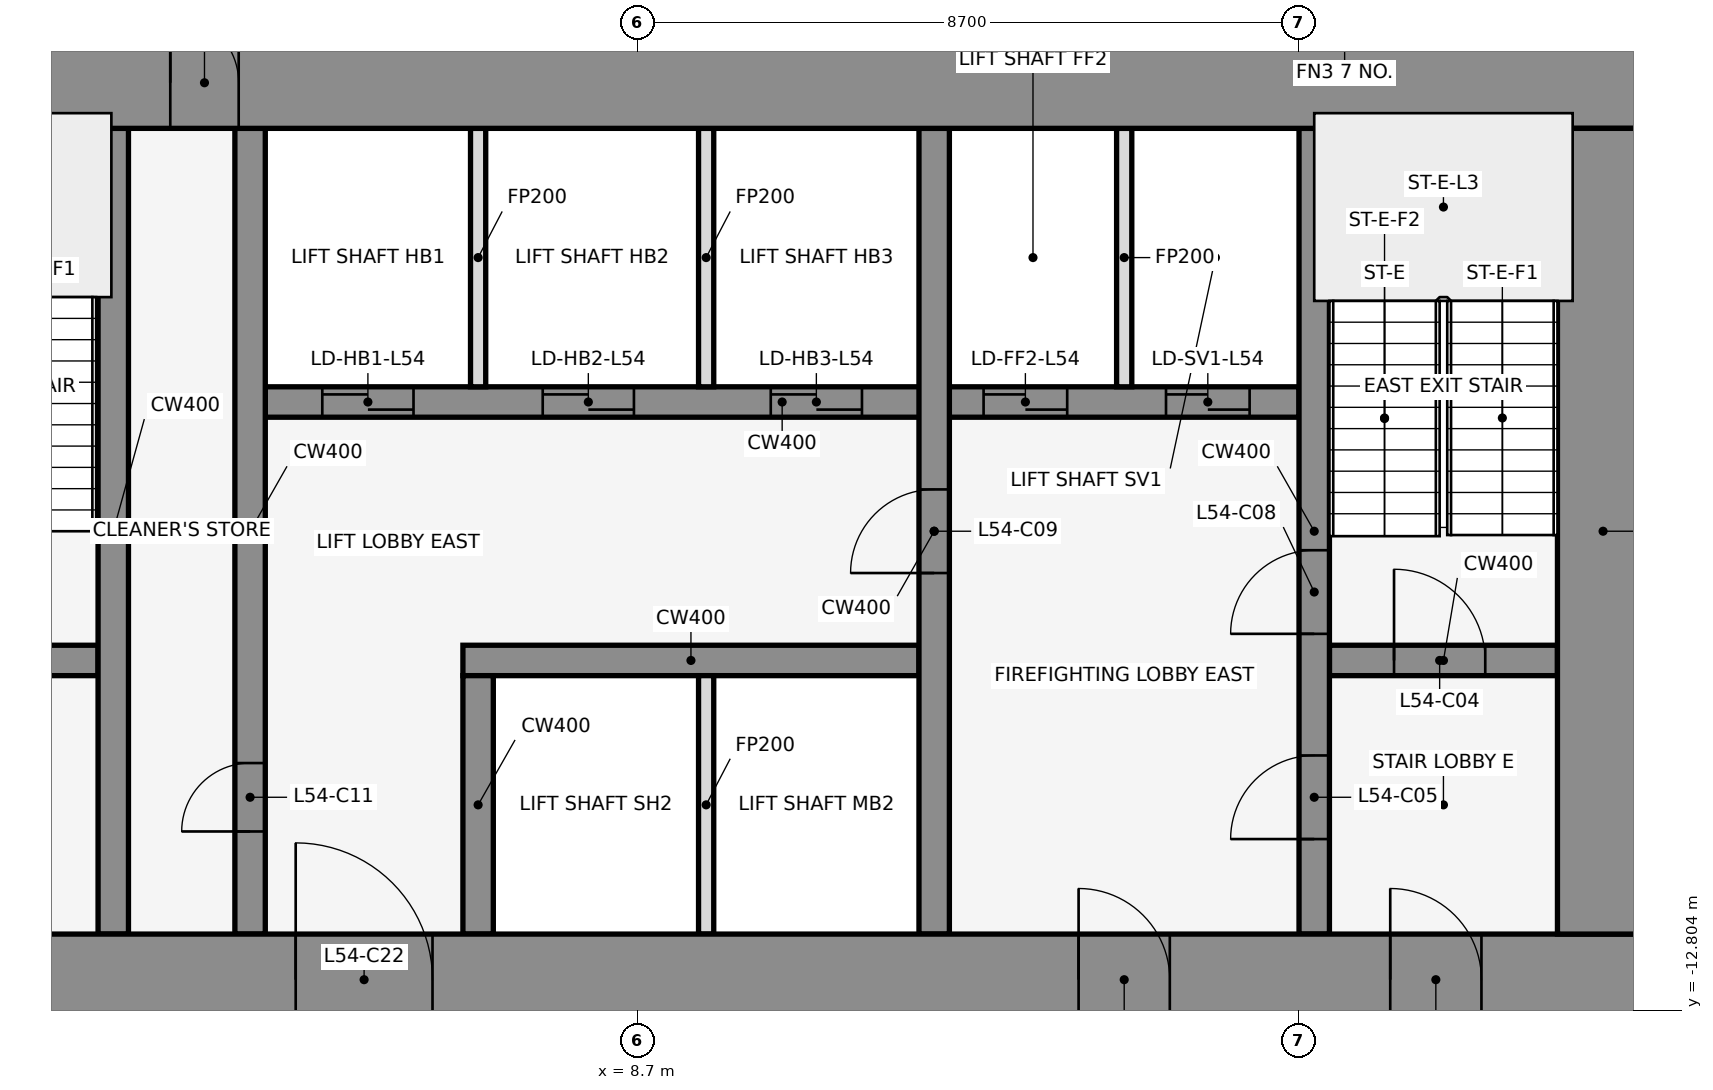
"""IFC4 building model, lengths in metres.
Left out: names, types, materials, properties, quantities, classifications, styles, units other than length and angle.
Written with IfcOpenShell. Run it as: python <this file> out.ifc"""

import sys

from ifc_helpers import new_model, si_unit, direction, frame, frame_2d, origin, place, context, subcontext, project, spatial, rectangle, extrude, element, fill, save


model = new_model("IFC4")
c1 = context("Model", 3, precision=1e-05, world=origin(), true_north=direction((0.0, 1.0)))
c2 = subcontext(c1, "Body", "Model", "MODEL_VIEW")
j1 = project(units=[si_unit("LENGTHUNIT", "METRE"), si_unit("PLANEANGLEUNIT", "RADIAN")], contexts=[c1])
p1 = place(None, origin())
s1 = spatial("IfcSite", under=j1, at=p1, CompositionType="ELEMENT")
p2 = place(p1, origin())
s2 = spatial("IfcBuilding", under=s1, at=p2, CompositionType="ELEMENT")
p3 = place(p2, frame((0.0, 0.0, 241.4)))
s3 = spatial("IfcBuildingStorey", under=s2, at=p3, CompositionType="ELEMENT", Elevation=241.4)
for number, where, z_axis, x_axis in (
    (1, (16.432, -0.105, 0.0), (0.0, 0.0, 1.0), (-0.84, 0.543, 0.0)),
    (2, (1.901, 1.08, 0.0), (0.0, 0.0, 1.0), (-0.84, -0.543, 0.0)),
):
    element("IfcWall", number, at=place(p3, frame(where, z_axis=z_axis, x_axis=x_axis)), inside=s3, PredefinedType="STANDARD", context=c2, shape_type="SweptSolid", body=[
        extrude(rectangle(XDim=2.183, YDim=0.25, at=frame_2d((1.091, 0.0))), origin(), (0.0, 0.0, 1.0), 4.05),
    ])
p4 = place(p3, frame((-1.6, -8.2, 0.0), z_axis=(0.0, 0.0, 1.0), x_axis=(1.0, 0.0, 0.0)))
e3 = element("IfcWall", 3, at=p4, inside=s3, PredefinedType="SHEAR", context=c2, shape_type="SweptSolid", body=[
    extrude(rectangle(XDim=3.2, YDim=0.4, at=frame_2d((1.6, 0.0))), origin(), (0.0, 0.0, 1.0), 4.2),
])
p5 = place(p4, frame((1.05, 0.0, 0.0)))
e4 = element("IfcOpeningElement", 4, at=p5, cuts=e3, PredefinedType="OPENING", context=c2, shape_type="SweptSolid", body=[
    extrude(rectangle(XDim=1.2, YDim=2.1, at=frame_2d((0.6, 1.05))), frame((0.0, 0.212, 0.0), z_axis=(0.0, -1.0, 0.0), x_axis=(1.0, 0.0, 0.0)), (0.0, 0.0, 1.0), 0.424),
])
p6 = place(p3, frame((6.4, -8.2, 0.0), z_axis=(0.0, 0.0, 1.0), x_axis=(1.0, 0.0, 0.0)))
e5 = element("IfcWall", 5, at=p6, inside=s3, PredefinedType="SHEAR", context=c2, shape_type="SweptSolid", body=[
    extrude(rectangle(XDim=6.0, YDim=0.4, at=frame_2d((3.0, 0.0))), origin(), (0.0, 0.0, 1.0), 4.2),
])
p7 = place(p3, frame((17.8, -8.2, 0.0), z_axis=(0.0, 0.0, 1.0), x_axis=(1.0, 0.0, 0.0)))
e6 = element("IfcWall", 6, at=p7, inside=s3, PredefinedType="SHEAR", context=c2, shape_type="SweptSolid", body=[
    extrude(rectangle(XDim=3.0, YDim=0.4, at=frame_2d((1.5, 0.0))), origin(), (0.0, 0.0, 1.0), 4.2),
])
p8 = place(p7, frame((0.85, 0.0, 0.0)))
e7 = element("IfcOpeningElement", 7, at=p8, cuts=e6, PredefinedType="OPENING", context=c2, shape_type="SweptSolid", body=[
    extrude(rectangle(XDim=1.2, YDim=2.1, at=frame_2d((0.6, 1.05))), frame((0.0, 0.212, 0.0), z_axis=(0.0, -1.0, 0.0), x_axis=(1.0, 0.0, 0.0)), (0.0, 0.0, 1.0), 0.424),
])
p9 = place(p3, frame((3.8, -4.8, 0.0), z_axis=(0.0, 0.0, 1.0), x_axis=(1.0, 0.0, 0.0)))
e8 = element("IfcWall", 8, at=p9, inside=s3, PredefinedType="SHEAR", context=c2, shape_type="SweptSolid", body=[
    extrude(rectangle(XDim=13.6, YDim=0.4, at=frame_2d((6.8, 0.0))), origin(), (0.0, 0.0, 1.0), 4.2),
])
p10 = place(p9, frame((0.75, 0.0, 0.0)))
e9 = element("IfcOpeningElement", 9, at=p10, cuts=e8, PredefinedType="OPENING", context=c2, shape_type="SweptSolid", body=[
    extrude(rectangle(XDim=1.2, YDim=2.1, at=frame_2d((0.6, 1.05))), frame((0.0, 0.212, 0.0), z_axis=(0.0, -1.0, 0.0), x_axis=(1.0, 0.0, 0.0)), (0.0, 0.0, 1.0), 0.424),
])
p11 = place(p9, frame((3.65, 0.0, 0.0)))
e10 = element("IfcOpeningElement", 10, at=p11, cuts=e8, PredefinedType="OPENING", context=c2, shape_type="SweptSolid", body=[
    extrude(rectangle(XDim=1.2, YDim=2.1, at=frame_2d((0.6, 1.05))), frame((0.0, 0.212, 0.0), z_axis=(0.0, -1.0, 0.0), x_axis=(1.0, 0.0, 0.0)), (0.0, 0.0, 1.0), 0.424),
])
p12 = place(p9, frame((6.65, 0.0, 0.0)))
e11 = element("IfcOpeningElement", 11, at=p12, cuts=e8, PredefinedType="OPENING", context=c2, shape_type="SweptSolid", body=[
    extrude(rectangle(XDim=1.2, YDim=2.1, at=frame_2d((0.6, 1.05))), frame((0.0, 0.212, 0.0), z_axis=(0.0, -1.0, 0.0), x_axis=(1.0, 0.0, 0.0)), (0.0, 0.0, 1.0), 0.424),
])
p13 = place(p9, frame((9.45, 0.0, 0.0)))
e12 = element("IfcOpeningElement", 12, at=p13, cuts=e8, PredefinedType="OPENING", context=c2, shape_type="SweptSolid", body=[
    extrude(rectangle(XDim=1.1, YDim=2.1, at=frame_2d((0.55, 1.05))), frame((0.0, 0.212, 0.0), z_axis=(0.0, -1.0, 0.0), x_axis=(1.0, 0.0, 0.0)), (0.0, 0.0, 1.0), 0.424),
])
p14 = place(p9, frame((11.85, 0.0, 0.0)))
e13 = element("IfcOpeningElement", 13, at=p14, cuts=e8, PredefinedType="OPENING", context=c2, shape_type="SweptSolid", body=[
    extrude(rectangle(XDim=1.1, YDim=2.1, at=frame_2d((0.55, 1.05))), frame((0.0, 0.212, 0.0), z_axis=(0.0, -1.0, 0.0), x_axis=(1.0, 0.0, 0.0)), (0.0, 0.0, 1.0), 0.424),
])
p15 = place(p3, frame((1.8, -11.8, 0.0), z_axis=(0.0, 0.0, 1.0), x_axis=(0.0, 1.0, 0.0)))
e14 = element("IfcWall", 14, at=p15, inside=s3, PredefinedType="SHEAR", context=c2, shape_type="SweptSolid", body=[
    extrude(rectangle(XDim=10.6, YDim=0.4, at=frame_2d((5.3, 0.0))), origin(), (0.0, 0.0, 1.0), 4.2),
])
p16 = place(p3, frame((3.6, -11.8, 0.0), z_axis=(0.0, 0.0, 1.0), x_axis=(0.0, 1.0, 0.0)))
e15 = element("IfcWall", 15, at=p16, inside=s3, PredefinedType="SHEAR", context=c2, shape_type="SweptSolid", body=[
    extrude(rectangle(XDim=10.6, YDim=0.4, at=frame_2d((5.3, 0.0))), origin(), (0.0, 0.0, 1.0), 4.2),
])
p17 = place(p16, frame((1.35, 0.0, 0.0)))
e16 = element("IfcOpeningElement", 16, at=p17, cuts=e15, PredefinedType="OPENING", context=c2, shape_type="SweptSolid", body=[
    extrude(rectangle(XDim=0.9, YDim=2.1, at=frame_2d((0.45, 1.05))), frame((0.0, 0.212, 0.0), z_axis=(0.0, -1.0, 0.0), x_axis=(1.0, 0.0, 0.0)), (0.0, 0.0, 1.0), 0.424),
])
p18 = place(p3, frame((6.6, -11.8, 0.0), z_axis=(0.0, 0.0, 1.0), x_axis=(0.0, 1.0, 0.0)))
e17 = element("IfcWall", 17, at=p18, inside=s3, PredefinedType="SHEAR", context=c2, shape_type="SweptSolid", body=[
    extrude(rectangle(XDim=3.4, YDim=0.4, at=frame_2d((1.7, 0.0))), origin(), (0.0, 0.0, 1.0), 4.2),
])
for number, where, z_axis, x_axis in (
    (18, (6.6, -4.6, 0.0), (0.0, 0.0, 1.0), (0.0, 1.0, 0.0)),
    (19, (9.6, -11.8, 0.0), (0.0, 0.0, 1.0), (0.0, 1.0, 0.0)),
    (20, (9.6, -4.6, 0.0), (0.0, 0.0, 1.0), (0.0, 1.0, 0.0)),
):
    element("IfcWall", number, at=place(p3, frame(where, z_axis=z_axis, x_axis=x_axis)), inside=s3, PredefinedType="PARTITIONING", context=c2, shape_type="SweptSolid", body=[
        extrude(rectangle(XDim=3.4, YDim=0.2, at=frame_2d((1.7, 0.0))), origin(), (0.0, 0.0, 1.0), 3.118),
    ])
p19 = place(p3, frame((12.6, -11.8, 0.0), z_axis=(0.0, 0.0, 1.0), x_axis=(0.0, 1.0, 0.0)))
e21 = element("IfcWall", 21, at=p19, inside=s3, PredefinedType="SHEAR", context=c2, shape_type="SweptSolid", body=[
    extrude(rectangle(XDim=10.6, YDim=0.4, at=frame_2d((5.3, 0.0))), origin(), (0.0, 0.0, 1.0), 4.2),
])
p20 = place(p19, frame((4.75, 0.0, 0.0)))
e22 = element("IfcOpeningElement", 22, at=p20, cuts=e21, PredefinedType="OPENING", context=c2, shape_type="SweptSolid", body=[
    extrude(rectangle(XDim=1.1, YDim=2.1, at=frame_2d((0.55, 1.05))), frame((0.0, 0.212, 0.0), z_axis=(0.0, -1.0, 0.0), x_axis=(1.0, 0.0, 0.0)), (0.0, 0.0, 1.0), 0.424),
])
p21 = place(p3, frame((15.1, -4.6, 0.0), z_axis=(0.0, 0.0, 1.0), x_axis=(0.0, 1.0, 0.0)))
e23 = element("IfcWall", 23, at=p21, inside=s3, PredefinedType="PARTITIONING", context=c2, shape_type="SweptSolid", body=[
    extrude(rectangle(XDim=3.4, YDim=0.2, at=frame_2d((1.7, 0.0))), origin(), (0.0, 0.0, 1.0), 3.118),
])
p22 = place(p3, frame((17.6, -11.8, 0.0), z_axis=(0.0, 0.0, 1.0), x_axis=(0.0, 1.0, 0.0)))
e24 = element("IfcWall", 24, at=p22, inside=s3, PredefinedType="SHEAR", context=c2, shape_type="SweptSolid", body=[
    extrude(rectangle(XDim=10.6, YDim=0.4, at=frame_2d((5.3, 0.0))), origin(), (0.0, 0.0, 1.0), 4.2),
])
p23 = place(p22, frame((1.25, 0.0, 0.0)))
e25 = element("IfcOpeningElement", 25, at=p23, cuts=e24, PredefinedType="OPENING", context=c2, shape_type="SweptSolid", body=[
    extrude(rectangle(XDim=1.1, YDim=2.1, at=frame_2d((0.55, 1.05))), frame((0.0, 0.212, 0.0), z_axis=(0.0, -1.0, 0.0), x_axis=(1.0, 0.0, 0.0)), (0.0, 0.0, 1.0), 0.424),
])
p24 = place(p22, frame((3.95, 0.0, 0.0)))
e26 = element("IfcOpeningElement", 26, at=p24, cuts=e24, PredefinedType="OPENING", context=c2, shape_type="SweptSolid", body=[
    extrude(rectangle(XDim=1.1, YDim=2.1, at=frame_2d((0.55, 1.05))), frame((0.0, 0.212, 0.0), z_axis=(0.0, -1.0, 0.0), x_axis=(1.0, 0.0, 0.0)), (0.0, 0.0, 1.0), 0.424),
])
p25 = place(p3, frame((-22.0, -0.6, 0.0), z_axis=(0.0, 0.0, 1.0), x_axis=(1.0, 0.0, 0.0)))
e27 = element("IfcWall", 27, at=p25, inside=s3, PredefinedType="SHEAR", context=c2, shape_type="SweptSolid", body=[
    extrude(rectangle(XDim=44.0, YDim=1.2, at=frame_2d((22.0, 0.0))), origin(), (0.0, 0.0, 1.0), 4.2),
])
p26 = place(p25, frame((18.55, 0.0, 0.0)))
e28 = element("IfcOpeningElement", 28, at=p26, cuts=e27, PredefinedType="OPENING", context=c2, shape_type="SweptSolid", body=[
    extrude(rectangle(XDim=0.9, YDim=2.1, at=frame_2d((0.45, 1.05))), frame((0.0, 0.612, 0.0), z_axis=(0.0, -1.0, 0.0), x_axis=(1.0, 0.0, 0.0)), (0.0, 0.0, 1.0), 1.224),
])
p27 = place(p25, frame((24.55, 0.0, 0.0)))
e29 = element("IfcOpeningElement", 29, at=p27, cuts=e27, PredefinedType="OPENING", context=c2, shape_type="SweptSolid", body=[
    extrude(rectangle(XDim=0.9, YDim=2.1, at=frame_2d((0.45, 1.05))), frame((0.0, 0.612, 0.0), z_axis=(0.0, -1.0, 0.0), x_axis=(1.0, 0.0, 0.0)), (0.0, 0.0, 1.0), 1.224),
])
p28 = place(p3, frame((-22.0, -12.4, 0.0), z_axis=(0.0, 0.0, 1.0), x_axis=(1.0, 0.0, 0.0)))
e30 = element("IfcWall", 30, at=p28, inside=s3, PredefinedType="SHEAR", context=c2, shape_type="SweptSolid", body=[
    extrude(rectangle(XDim=44.0, YDim=1.2, at=frame_2d((22.0, 0.0))), origin(), (0.0, 0.0, 1.0), 4.2),
])
p29 = place(p28, frame((2.2, 0.0, 0.0)))
e31 = element("IfcOpeningElement", 31, at=p29, cuts=e30, PredefinedType="OPENING", context=c2, shape_type="SweptSolid", body=[
    extrude(rectangle(XDim=1.2, YDim=2.1, at=frame_2d((0.6, 1.05))), frame((0.0, 0.612, 0.0), z_axis=(0.0, -1.0, 0.0), x_axis=(1.0, 0.0, 0.0)), (0.0, 0.0, 1.0), 1.224),
])
p30 = place(p28, frame((21.4, 0.0, 0.0)))
e32 = element("IfcOpeningElement", 32, at=p30, cuts=e30, PredefinedType="OPENING", context=c2, shape_type="SweptSolid", body=[
    extrude(rectangle(XDim=1.2, YDim=2.1, at=frame_2d((0.6, 1.05))), frame((0.0, 0.612, 0.0), z_axis=(0.0, -1.0, 0.0), x_axis=(1.0, 0.0, 0.0)), (0.0, 0.0, 1.0), 1.224),
])
p31 = place(p28, frame((40.6, 0.0, 0.0)))
e33 = element("IfcOpeningElement", 33, at=p31, cuts=e30, PredefinedType="OPENING", context=c2, shape_type="SweptSolid", body=[
    extrude(rectangle(XDim=1.2, YDim=2.1, at=frame_2d((0.6, 1.05))), frame((0.0, 0.612, 0.0), z_axis=(0.0, -1.0, 0.0), x_axis=(1.0, 0.0, 0.0)), (0.0, 0.0, 1.0), 1.224),
])
p32 = place(p28, frame((16.0, 0.0, 0.0)))
e34 = element("IfcOpeningElement", 34, at=p32, cuts=e30, PredefinedType="OPENING", context=c2, shape_type="SweptSolid", body=[
    extrude(rectangle(XDim=1.8, YDim=2.1, at=frame_2d((0.9, 1.05))), frame((0.0, 0.612, 0.0), z_axis=(0.0, -1.0, 0.0), x_axis=(1.0, 0.0, 0.0)), (0.0, 0.0, 1.0), 1.224),
])
p33 = place(p28, frame((6.3, 0.0, 0.0)))
e35 = element("IfcOpeningElement", 35, at=p33, cuts=e30, PredefinedType="OPENING", context=c2, shape_type="SweptSolid", body=[
    extrude(rectangle(XDim=1.2, YDim=2.1, at=frame_2d((0.6, 1.05))), frame((0.0, 0.612, 0.0), z_axis=(0.0, -1.0, 0.0), x_axis=(1.0, 0.0, 0.0)), (0.0, 0.0, 1.0), 1.224),
])
p34 = place(p28, frame((26.2, 0.0, 0.0)))
e36 = element("IfcOpeningElement", 36, at=p34, cuts=e30, PredefinedType="OPENING", context=c2, shape_type="SweptSolid", body=[
    extrude(rectangle(XDim=1.8, YDim=2.1, at=frame_2d((0.9, 1.05))), frame((0.0, 0.612, 0.0), z_axis=(0.0, -1.0, 0.0), x_axis=(1.0, 0.0, 0.0)), (0.0, 0.0, 1.0), 1.224),
])
p35 = place(p28, frame((36.5, 0.0, 0.0)))
e37 = element("IfcOpeningElement", 37, at=p35, cuts=e30, PredefinedType="OPENING", context=c2, shape_type="SweptSolid", body=[
    extrude(rectangle(XDim=1.2, YDim=2.1, at=frame_2d((0.6, 1.05))), frame((0.0, 0.612, 0.0), z_axis=(0.0, -1.0, 0.0), x_axis=(1.0, 0.0, 0.0)), (0.0, 0.0, 1.0), 1.224),
])
p36 = place(p3, frame((21.4, -11.8, 0.0), z_axis=(0.0, 0.0, 1.0), x_axis=(0.0, 1.0, 0.0)))
e38 = element("IfcWall", 38, at=p36, inside=s3, PredefinedType="SHEAR", context=c2, shape_type="SweptSolid", body=[
    extrude(rectangle(XDim=10.6, YDim=1.2, at=frame_2d((5.3, 0.0))), origin(), (0.0, 0.0, 1.0), 4.2),
])
p37 = place(p8, origin())
e39 = element("IfcDoor", 39, at=p37, inside=s3, OperationType="SINGLE_SWING_RIGHT", PredefinedType="DOOR", context=c2, shape_type="SweptSolid", body=[
    extrude(rectangle(XDim=1.2, YDim=2.1, at=frame_2d((0.6, 1.05))), frame((0.0, 0.025, 0.0), z_axis=(0.0, -1.0, 0.0), x_axis=(1.0, 0.0, 0.0)), (0.0, 0.0, 1.0), 0.05),
])
fill(e7, e39)
p38 = place(p23, origin())
e40 = element("IfcDoor", 40, at=p38, inside=s3, OperationType="SINGLE_SWING_LEFT", PredefinedType="DOOR", context=c2, shape_type="SweptSolid", body=[
    extrude(rectangle(XDim=1.1, YDim=2.1, at=frame_2d((0.55, 1.05))), frame((0.0, 0.025, 0.0), z_axis=(0.0, -1.0, 0.0), x_axis=(1.0, 0.0, 0.0)), (0.0, 0.0, 1.0), 0.05),
])
fill(e25, e40)
p39 = place(p10, origin())
e41 = element("IfcDoor", 41, at=p39, inside=s3, OperationType="DOUBLE_DOOR_SLIDING", PredefinedType="DOOR", context=c2, shape_type="SweptSolid", body=[
    extrude(rectangle(XDim=1.2, YDim=2.1, at=frame_2d((0.6, 1.05))), frame((0.0, 0.025, 0.0), z_axis=(0.0, -1.0, 0.0), x_axis=(1.0, 0.0, 0.0)), (0.0, 0.0, 1.0), 0.05),
])
fill(e9, e41)
p40 = place(p11, origin())
e42 = element("IfcDoor", 42, at=p40, inside=s3, OperationType="DOUBLE_DOOR_SLIDING", PredefinedType="DOOR", context=c2, shape_type="SweptSolid", body=[
    extrude(rectangle(XDim=1.2, YDim=2.1, at=frame_2d((0.6, 1.05))), frame((0.0, 0.025, 0.0), z_axis=(0.0, -1.0, 0.0), x_axis=(1.0, 0.0, 0.0)), (0.0, 0.0, 1.0), 0.05),
])
fill(e10, e42)
p41 = place(p12, origin())
e43 = element("IfcDoor", 43, at=p41, inside=s3, OperationType="DOUBLE_DOOR_SLIDING", PredefinedType="DOOR", context=c2, shape_type="SweptSolid", body=[
    extrude(rectangle(XDim=1.2, YDim=2.1, at=frame_2d((0.6, 1.05))), frame((0.0, 0.025, 0.0), z_axis=(0.0, -1.0, 0.0), x_axis=(1.0, 0.0, 0.0)), (0.0, 0.0, 1.0), 0.05),
])
fill(e11, e43)
p42 = place(p13, origin())
e44 = element("IfcDoor", 44, at=p42, inside=s3, OperationType="DOUBLE_DOOR_SLIDING", PredefinedType="DOOR", context=c2, shape_type="SweptSolid", body=[
    extrude(rectangle(XDim=1.1, YDim=2.1, at=frame_2d((0.55, 1.05))), frame((0.0, 0.025, 0.0), z_axis=(0.0, -1.0, 0.0), x_axis=(1.0, 0.0, 0.0)), (0.0, 0.0, 1.0), 0.05),
])
fill(e12, e44)
p43 = place(p14, origin())
e45 = element("IfcDoor", 45, at=p43, inside=s3, OperationType="DOUBLE_DOOR_SLIDING", PredefinedType="DOOR", context=c2, shape_type="SweptSolid", body=[
    extrude(rectangle(XDim=1.1, YDim=2.1, at=frame_2d((0.55, 1.05))), frame((0.0, 0.025, 0.0), z_axis=(0.0, -1.0, 0.0), x_axis=(1.0, 0.0, 0.0)), (0.0, 0.0, 1.0), 0.05),
])
fill(e13, e45)
p44 = place(p24, origin())
e46 = element("IfcDoor", 46, at=p44, inside=s3, OperationType="SINGLE_SWING_RIGHT", PredefinedType="DOOR", context=c2, shape_type="SweptSolid", body=[
    extrude(rectangle(XDim=1.1, YDim=2.1, at=frame_2d((0.55, 1.05))), frame((0.0, 0.025, 0.0), z_axis=(0.0, -1.0, 0.0), x_axis=(1.0, 0.0, 0.0)), (0.0, 0.0, 1.0), 0.05),
])
fill(e26, e46)
p45 = place(p20, frame((1.1, 0.0, 0.0), z_axis=(0.0, 0.0, 1.0), x_axis=(-1.0, 0.0, 0.0)))
e47 = element("IfcDoor", 47, at=p45, inside=s3, OperationType="SINGLE_SWING_RIGHT", PredefinedType="DOOR", context=c2, shape_type="SweptSolid", body=[
    extrude(rectangle(XDim=1.1, YDim=2.1, at=frame_2d((0.55, 1.05))), frame((0.0, 0.025, 0.0), z_axis=(0.0, -1.0, 0.0), x_axis=(1.0, 0.0, 0.0)), (0.0, 0.0, 1.0), 0.05),
])
fill(e22, e47)
p46 = place(p17, origin())
e48 = element("IfcDoor", 48, at=p46, inside=s3, OperationType="SINGLE_SWING_LEFT", PredefinedType="DOOR", context=c2, shape_type="SweptSolid", body=[
    extrude(rectangle(XDim=0.9, YDim=2.1, at=frame_2d((0.45, 1.05))), frame((0.0, 0.025, 0.0), z_axis=(0.0, -1.0, 0.0), x_axis=(1.0, 0.0, 0.0)), (0.0, 0.0, 1.0), 0.05),
])
fill(e16, e48)
p47 = place(p27, origin())
e49 = element("IfcDoor", 49, at=p47, inside=s3, OperationType="SINGLE_SWING_LEFT", PredefinedType="DOOR", context=c2, shape_type="SweptSolid", body=[
    extrude(rectangle(XDim=0.9, YDim=2.1, at=frame_2d((0.45, 1.05))), frame((0.0, 0.025, 0.0), z_axis=(0.0, -1.0, 0.0), x_axis=(1.0, 0.0, 0.0)), (0.0, 0.0, 1.0), 0.05),
])
fill(e29, e49)
p48 = place(p31, frame((1.2, 0.0, 0.0), z_axis=(0.0, 0.0, 1.0), x_axis=(-1.0, 0.0, 0.0)))
e50 = element("IfcDoor", 50, at=p48, inside=s3, OperationType="SINGLE_SWING_RIGHT", PredefinedType="DOOR", context=c2, shape_type="SweptSolid", body=[
    extrude(rectangle(XDim=1.2, YDim=2.1, at=frame_2d((0.6, 1.05))), frame((0.0, 0.025, 0.0), z_axis=(0.0, -1.0, 0.0), x_axis=(1.0, 0.0, 0.0)), (0.0, 0.0, 1.0), 0.05),
])
fill(e33, e50)
p49 = place(p34, origin())
e51 = element("IfcDoor", 51, at=p49, inside=s3, OperationType="SINGLE_SWING_LEFT", PredefinedType="DOOR", context=c2, shape_type="SweptSolid", body=[
    extrude(rectangle(XDim=1.8, YDim=2.1, at=frame_2d((0.9, 1.05))), frame((0.0, 0.025, 0.0), z_axis=(0.0, -1.0, 0.0), x_axis=(1.0, 0.0, 0.0)), (0.0, 0.0, 1.0), 0.05),
])
fill(e36, e51)
p50 = place(p35, frame((1.2, 0.0, 0.0), z_axis=(0.0, 0.0, 1.0), x_axis=(-1.0, 0.0, 0.0)))
e52 = element("IfcDoor", 52, at=p50, inside=s3, OperationType="SINGLE_SWING_RIGHT", PredefinedType="DOOR", context=c2, shape_type="SweptSolid", body=[
    extrude(rectangle(XDim=1.2, YDim=2.1, at=frame_2d((0.6, 1.05))), frame((0.0, 0.025, 0.0), z_axis=(0.0, -1.0, 0.0), x_axis=(1.0, 0.0, 0.0)), (0.0, 0.0, 1.0), 0.05),
])
fill(e37, e52)
save(model, sys.argv[1])
